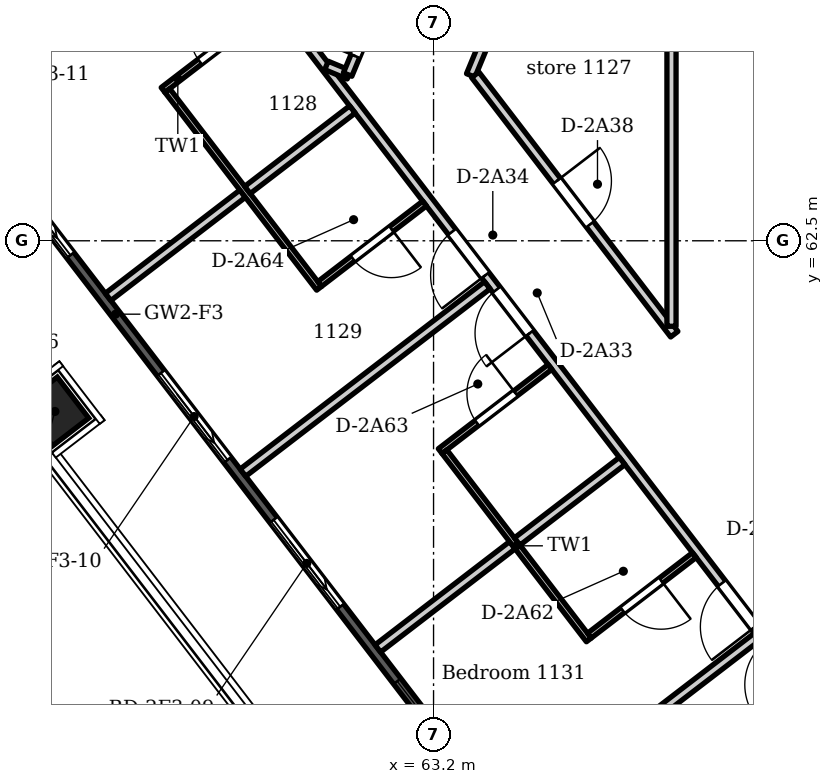
"""IFC4 building model, lengths in metres.
Left out: names, types, materials, properties, quantities, classifications, styles, units other than length and angle.
Written with IfcOpenShell. Run it as: python <this file> out.ifc"""

import sys

from ifc_helpers import new_model, si_unit, direction, frame, frame_2d, origin, origin_2d, place, context, subcontext, project, spatial, polyline, rectangle, outline, extrude, element, fill, save


model = new_model("IFC4")
c1 = context("Model", 3, precision=1e-05, world=origin(), true_north=direction((0.0, 1.0)))
c2 = subcontext(c1, "Body", "Model", "MODEL_VIEW")
j1 = project(units=[si_unit("LENGTHUNIT", "METRE"), si_unit("PLANEANGLEUNIT", "RADIAN")], contexts=[c1])
p1 = place(None, origin())
s1 = spatial("IfcSite", under=j1, at=p1, CompositionType="ELEMENT")
p2 = place(p1, origin())
s2 = spatial("IfcBuilding", under=s1, at=p2, CompositionType="ELEMENT")
p3 = place(p2, frame((0.0, 0.0, 50.4)))
s3 = spatial("IfcBuildingStorey", under=s2, at=p3, CompositionType="ELEMENT", Elevation=50.4)
p4 = place(p3, frame((56.974, 59.693, -0.35), z_axis=(0.0, 0.0, 1.0), x_axis=(-0.608761429009, 0.793353340291, 0.0)))
e1 = element("IfcColumn", 1, at=p4, inside=s3, PredefinedType="COLUMN", context=c2, shape_type="SweptSolid", body=[
    extrude(rectangle(XDim=0.85, YDim=0.75, at=origin_2d()), origin(), (0.0, 0.0, 1.0), 3.95),
])
p5 = place(p3, frame((79.969, 32.624, 0.0), z_axis=(0.0, 0.0, 1.0), x_axis=(-0.608761526367, 0.793353265585, 0.0)))
e2 = element("IfcWall", 2, at=p5, inside=s3, PredefinedType="SOLIDWALL", context=c2, shape_type="SweptSolid", body=[
    extrude(outline(polyline([(0.149, 0.075), (0.149, -0.075), (47.217, -0.075), (47.217, 0.075), (0.149, 0.075)])), origin(), (0.0, 0.0, 1.0), 3.3),
])
p6 = place(p5, frame((1.222, 0.0, 0.0)))
e3 = element("IfcOpeningElement", 3, at=p6, cuts=e2, PredefinedType="OPENING", context=c2, shape_type="SweptSolid", body=[
    extrude(rectangle(XDim=1.8, YDim=2.6, at=frame_2d((0.9, 1.3))), frame((0.0, 0.085, 0.0), z_axis=(0.0, -1.0, 0.0), x_axis=(1.0, 0.0, 0.0)), (0.0, 0.0, 1.0), 0.17),
])
p7 = place(p5, frame((4.565, 0.0, 0.0)))
e4 = element("IfcOpeningElement", 4, at=p7, cuts=e2, PredefinedType="OPENING", context=c2, shape_type="SweptSolid", body=[
    extrude(rectangle(XDim=1.8, YDim=2.6, at=frame_2d((0.9, 1.3))), frame((0.0, 0.085, 0.0), z_axis=(0.0, -1.0, 0.0), x_axis=(1.0, 0.0, 0.0)), (0.0, 0.0, 1.0), 0.17),
])
p8 = place(p5, frame((8.209, 0.0, 0.0)))
e5 = element("IfcOpeningElement", 5, at=p8, cuts=e2, PredefinedType="OPENING", context=c2, shape_type="SweptSolid", body=[
    extrude(rectangle(XDim=1.8, YDim=2.6, at=frame_2d((0.9, 1.3))), frame((0.0, 0.085, 0.0), z_axis=(0.0, -1.0, 0.0), x_axis=(1.0, 0.0, 0.0)), (0.0, 0.0, 1.0), 0.17),
])
p9 = place(p5, frame((12.453, 0.0, 0.0)))
e6 = element("IfcOpeningElement", 6, at=p9, cuts=e2, PredefinedType="OPENING", context=c2, shape_type="SweptSolid", body=[
    extrude(rectangle(XDim=1.8, YDim=2.6, at=frame_2d((0.9, 1.3))), frame((0.0, 0.085, 0.0), z_axis=(0.0, -1.0, 0.0), x_axis=(1.0, 0.0, 0.0)), (0.0, 0.0, 1.0), 0.17),
])
p10 = place(p5, frame((15.496, 0.0, 0.0)))
e7 = element("IfcOpeningElement", 7, at=p10, cuts=e2, PredefinedType="OPENING", context=c2, shape_type="SweptSolid", body=[
    extrude(rectangle(XDim=1.8, YDim=2.6, at=frame_2d((0.9, 1.3))), frame((0.0, 0.085, 0.0), z_axis=(0.0, -1.0, 0.0), x_axis=(1.0, 0.0, 0.0)), (0.0, 0.0, 1.0), 0.17),
])
p11 = place(p5, frame((18.84, 0.0, 0.15)))
e8 = element("IfcOpeningElement", 8, at=p11, cuts=e2, PredefinedType="OPENING", context=c2, shape_type="SweptSolid", body=[
    extrude(rectangle(XDim=2.4, YDim=2.45, at=frame_2d((1.2, 1.225))), frame((0.0, 0.085, 0.0), z_axis=(0.0, -1.0, 0.0), x_axis=(1.0, 0.0, 0.0)), (0.0, 0.0, 1.0), 0.17),
])
p12 = place(p5, frame((22.783, 0.0, 0.0)))
e9 = element("IfcOpeningElement", 9, at=p12, cuts=e2, PredefinedType="OPENING", context=c2, shape_type="SweptSolid", body=[
    extrude(rectangle(XDim=1.8, YDim=2.6, at=frame_2d((0.9, 1.3))), frame((0.0, 0.085, 0.0), z_axis=(0.0, -1.0, 0.0), x_axis=(1.0, 0.0, 0.0)), (0.0, 0.0, 1.0), 0.17),
])
p13 = place(p5, frame((26.127, 0.0, 0.15)))
e10 = element("IfcOpeningElement", 10, at=p13, cuts=e2, PredefinedType="OPENING", context=c2, shape_type="SweptSolid", body=[
    extrude(rectangle(XDim=2.4, YDim=2.45, at=frame_2d((1.2, 1.225))), frame((0.0, 0.085, 0.0), z_axis=(0.0, -1.0, 0.0), x_axis=(1.0, 0.0, 0.0)), (0.0, 0.0, 1.0), 0.17),
])
p14 = place(p5, frame((30.071, 0.0, 0.0)))
e11 = element("IfcOpeningElement", 11, at=p14, cuts=e2, PredefinedType="OPENING", context=c2, shape_type="SweptSolid", body=[
    extrude(rectangle(XDim=1.8, YDim=2.6, at=frame_2d((0.9, 1.3))), frame((0.0, 0.085, 0.0), z_axis=(0.0, -1.0, 0.0), x_axis=(1.0, 0.0, 0.0)), (0.0, 0.0, 1.0), 0.17),
])
p15 = place(p5, frame((33.114, 0.0, 0.0)))
e12 = element("IfcOpeningElement", 12, at=p15, cuts=e2, PredefinedType="OPENING", context=c2, shape_type="SweptSolid", body=[
    extrude(rectangle(XDim=1.8, YDim=2.6, at=frame_2d((0.9, 1.3))), frame((0.0, 0.085, 0.0), z_axis=(0.0, -1.0, 0.0), x_axis=(1.0, 0.0, 0.0)), (0.0, 0.0, 1.0), 0.17),
])
p16 = place(p5, frame((37.358, 0.0, 0.0)))
e13 = element("IfcOpeningElement", 13, at=p16, cuts=e2, PredefinedType="OPENING", context=c2, shape_type="SweptSolid", body=[
    extrude(rectangle(XDim=1.8, YDim=2.6, at=frame_2d((0.9, 1.3))), frame((0.0, 0.085, 0.0), z_axis=(0.0, -1.0, 0.0), x_axis=(1.0, 0.0, 0.0)), (0.0, 0.0, 1.0), 0.17),
])
p17 = place(p5, frame((41.001, 0.0, 0.0)))
e14 = element("IfcOpeningElement", 14, at=p17, cuts=e2, PredefinedType="OPENING", context=c2, shape_type="SweptSolid", body=[
    extrude(rectangle(XDim=1.8, YDim=2.6, at=frame_2d((0.9, 1.3))), frame((0.0, 0.085, 0.0), z_axis=(0.0, -1.0, 0.0), x_axis=(1.0, 0.0, 0.0)), (0.0, 0.0, 1.0), 0.17),
])
p18 = place(p5, frame((44.345, 0.0, 0.0)))
e15 = element("IfcOpeningElement", 15, at=p18, cuts=e2, PredefinedType="OPENING", context=c2, shape_type="SweptSolid", body=[
    extrude(rectangle(XDim=1.8, YDim=2.6, at=frame_2d((0.9, 1.3))), frame((0.0, 0.085, 0.0), z_axis=(0.0, -1.0, 0.0), x_axis=(1.0, 0.0, 0.0)), (0.0, 0.0, 1.0), 0.17),
])
p19 = place(p3, frame((57.534, 70.427, 0.0), z_axis=(0.0, 0.0, 1.0), x_axis=(0.608794371867, -0.793328061261, 0.0)))
e16 = element("IfcWall", 16, at=p19, inside=s3, PredefinedType="PARTITIONING", context=c2, shape_type="SweptSolid", body=[
    extrude(rectangle(XDim=19.759, YDim=0.15, at=frame_2d((9.88, 0.0))), origin(), (0.0, 0.0, 1.0), 3.3),
])
p20 = place(p19, frame((18.293, 0.0, 0.0)))
e17 = element("IfcOpeningElement", 17, at=p20, cuts=e16, PredefinedType="OPENING", context=c2, shape_type="SweptSolid", body=[
    extrude(rectangle(XDim=0.9, YDim=2.1, at=frame_2d((0.45, 1.05))), frame((0.0, 0.085, 0.0), z_axis=(0.0, -1.0, 0.0), x_axis=(1.0, 0.0, 0.0)), (0.0, 0.0, 1.0), 0.17),
])
p21 = place(p19, frame((17.093, 0.0, 0.0)))
e18 = element("IfcOpeningElement", 18, at=p21, cuts=e16, PredefinedType="OPENING", context=c2, shape_type="SweptSolid", body=[
    extrude(rectangle(XDim=0.9, YDim=2.1, at=frame_2d((0.45, 1.05))), frame((0.0, 0.085, 0.0), z_axis=(0.0, -1.0, 0.0), x_axis=(1.0, 0.0, 0.0)), (0.0, 0.0, 1.0), 0.17),
])
p22 = place(p19, frame((11.006, 0.0, 0.0)))
e19 = element("IfcOpeningElement", 19, at=p22, cuts=e16, PredefinedType="OPENING", context=c2, shape_type="SweptSolid", body=[
    extrude(rectangle(XDim=0.9, YDim=2.1, at=frame_2d((0.45, 1.05))), frame((0.0, 0.085, 0.0), z_axis=(0.0, -1.0, 0.0), x_axis=(1.0, 0.0, 0.0)), (0.0, 0.0, 1.0), 0.17),
])
p23 = place(p19, frame((9.806, 0.0, 0.0)))
e20 = element("IfcOpeningElement", 20, at=p23, cuts=e16, PredefinedType="OPENING", context=c2, shape_type="SweptSolid", body=[
    extrude(rectangle(XDim=0.9, YDim=2.1, at=frame_2d((0.45, 1.05))), frame((0.0, 0.085, 0.0), z_axis=(0.0, -1.0, 0.0), x_axis=(1.0, 0.0, 0.0)), (0.0, 0.0, 1.0), 0.17),
])
p24 = place(p3, frame((57.848, 61.576, 0.0), z_axis=(0.0, 0.0, 1.0), x_axis=(0.793280814045, 0.608855935397, 0.0)))
e21 = element("IfcWall", 21, at=p24, inside=s3, PredefinedType="PARTITIONING", context=c2, shape_type="SweptSolid", body=[
    extrude(rectangle(XDim=2.789, YDim=0.15, at=frame_2d((1.395, 0.0))), origin(), (0.0, 0.0, 1.0), 3.3),
])
p25 = place(p3, frame((58.751, 64.981, 0.0), z_axis=(0.0, 0.0, 1.0), x_axis=(0.793437070432, 0.608652294224, 0.0)))
e22 = element("IfcWall", 22, at=p25, inside=s3, PredefinedType="PARTITIONING", context=c2, shape_type="SweptSolid", body=[
    extrude(rectangle(XDim=2.275, YDim=0.1, at=frame_2d((1.138, 0.0))), origin(), (0.0, 0.0, 1.0), 3.3),
])
p26 = place(p25, frame((0.762, 0.0, 0.0)))
e23 = element("IfcOpeningElement", 23, at=p26, cuts=e22, PredefinedType="OPENING", context=c2, shape_type="SweptSolid", body=[
    extrude(rectangle(XDim=0.8, YDim=2.1, at=frame_2d((0.4, 1.05))), frame((0.0, 0.06, 0.0), z_axis=(0.0, -1.0, 0.0), x_axis=(1.0, 0.0, 0.0)), (0.0, 0.0, 1.0), 0.12),
])
p27 = place(p3, frame((58.821, 64.971, 0.0), z_axis=(0.0, 0.0, 1.0), x_axis=(0.608766496324, -0.793349451978, 0.0)))
e24 = element("IfcWall", 24, at=p27, inside=s3, PredefinedType="PARTITIONING", context=c2, shape_type="SweptSolid", body=[
    extrude(rectangle(XDim=4.1, YDim=0.1, at=frame_2d((2.05, 0.0))), origin(), (0.0, 0.0, 1.0), 3.3),
])
p28 = place(p3, frame((60.066, 58.686, 0.0), z_axis=(0.0, 0.0, 1.0), x_axis=(0.793444149255, 0.608643066184, 0.0)))
e25 = element("IfcWall", 25, at=p28, inside=s3, PredefinedType="PARTITIONING", context=c2, shape_type="SweptSolid", body=[
    extrude(rectangle(XDim=5.064, YDim=0.15, at=frame_2d((2.532, 0.0))), origin(), (0.0, 0.0, 1.0), 3.3),
])
p29 = place(p3, frame((60.14, 63.335, 0.0), z_axis=(0.0, 0.0, 1.0), x_axis=(0.79342025342, 0.608674216197, 0.0)))
e26 = element("IfcWall", 26, at=p29, inside=s3, PredefinedType="PARTITIONING", context=c2, shape_type="SweptSolid", body=[
    extrude(rectangle(XDim=2.175, YDim=0.15, at=frame_2d((1.088, 0.0))), origin(), (0.0, 0.0, 1.0), 3.3),
])
p30 = place(p3, frame((61.327, 61.788, 0.0), z_axis=(0.0, 0.0, 1.0), x_axis=(0.79342025342, 0.608674216197, 0.0)))
e27 = element("IfcWall", 27, at=p30, inside=s3, PredefinedType="PARTITIONING", context=c2, shape_type="SweptSolid", body=[
    extrude(rectangle(XDim=2.175, YDim=0.1, at=frame_2d((1.088, 0.0))), origin(), (0.0, 0.0, 1.0), 3.3),
])
p31 = place(p30, frame((0.688, 0.0, 0.0)))
e28 = element("IfcOpeningElement", 28, at=p31, cuts=e27, PredefinedType="OPENING", context=c2, shape_type="SweptSolid", body=[
    extrude(rectangle(XDim=0.8, YDim=2.1, at=frame_2d((0.4, 1.05))), frame((0.0, 0.06, 0.0), z_axis=(0.0, -1.0, 0.0), x_axis=(1.0, 0.0, 0.0)), (0.0, 0.0, 1.0), 0.12),
])
p32 = place(p3, frame((61.439, 65.383, 0.0), z_axis=(0.0, 0.0, 1.0), x_axis=(0.923599819829, -0.383358021714, 0.0)))
e29 = element("IfcWall", 29, at=p32, inside=s3, PredefinedType="PARTITIONING", context=c2, shape_type="SweptSolid", body=[
    extrude(rectangle(XDim=0.4, YDim=0.15, at=frame_2d((0.2, 0.0))), origin(), (0.0, 0.0, 1.0), 3.3),
])
p33 = place(p3, frame((61.787, 65.234, 0.0), z_axis=(0.0, 0.0, 1.0), x_axis=(0.38314285934, 0.923689097769, 0.0)))
e30 = element("IfcWall", 30, at=p33, inside=s3, PredefinedType="PARTITIONING", context=c2, shape_type="SweptSolid", body=[
    extrude(rectangle(XDim=1.908, YDim=0.15, at=frame_2d((0.954, 0.0))), origin(), (0.0, 0.0, 1.0), 3.3),
])
p34 = place(p33, frame((0.328, 0.0, 0.0)))
e31 = element("IfcOpeningElement", 31, at=p34, cuts=e30, PredefinedType="OPENING", context=c2, shape_type="SweptSolid", body=[
    extrude(rectangle(XDim=0.8, YDim=2.1, at=frame_2d((0.4, 1.05))), frame((0.0, 0.085, 0.0), z_axis=(0.0, -1.0, 0.0), x_axis=(1.0, 0.0, 0.0)), (0.0, 0.0, 1.0), 0.17),
])
p35 = place(p3, frame((62.284, 55.795, 0.0), z_axis=(0.0, 0.0, 1.0), x_axis=(0.793280814045, 0.608855935397, 0.0)))
e32 = element("IfcWall", 32, at=p35, inside=s3, PredefinedType="PARTITIONING", context=c2, shape_type="SweptSolid", body=[
    extrude(rectangle(XDim=2.789, YDim=0.15, at=frame_2d((1.395, 0.0))), origin(), (0.0, 0.0, 1.0), 3.3),
])
p36 = place(p3, frame((63.309, 59.041, 0.0), z_axis=(0.0, 0.0, 1.0), x_axis=(0.793437070432, 0.608652294224, 0.0)))
e33 = element("IfcWall", 33, at=p36, inside=s3, PredefinedType="PARTITIONING", context=c2, shape_type="SweptSolid", body=[
    extrude(rectangle(XDim=2.275, YDim=0.1, at=frame_2d((1.138, 0.0))), origin(), (0.0, 0.0, 1.0), 3.3),
])
p37 = place(p36, frame((0.762, 0.0, 0.0)))
e34 = element("IfcOpeningElement", 34, at=p37, cuts=e33, PredefinedType="OPENING", context=c2, shape_type="SweptSolid", body=[
    extrude(rectangle(XDim=0.8, YDim=2.1, at=frame_2d((0.4, 1.05))), frame((0.0, 0.06, 0.0), z_axis=(0.0, -1.0, 0.0), x_axis=(1.0, 0.0, 0.0)), (0.0, 0.0, 1.0), 0.12),
])
p38 = place(p3, frame((63.379, 59.031, 0.0), z_axis=(0.0, 0.0, 1.0), x_axis=(0.608627311208, -0.79345623449, 0.0)))
e35 = element("IfcWall", 35, at=p38, inside=s3, PredefinedType="PARTITIONING", context=c2, shape_type="SweptSolid", body=[
    extrude(rectangle(XDim=3.901, YDim=0.1, at=frame_2d((1.95, 0.0))), origin(), (0.0, 0.0, 1.0), 3.3),
])
p39 = place(p3, frame((63.811, 65.22, 0.0), z_axis=(0.0, 0.0, 1.0), x_axis=(0.382485754441, 0.923961388614, 0.0)))
e36 = element("IfcWall", 36, at=p39, inside=s3, PredefinedType="PARTITIONING", context=c2, shape_type="SweptSolid", body=[
    extrude(rectangle(XDim=2.736, YDim=0.15, at=frame_2d((1.368, 0.0))), origin(), (0.0, 0.0, 1.0), 3.3),
])
p40 = place(p3, frame((63.886, 65.229, 0.0), z_axis=(0.0, 0.0, 1.0), x_axis=(0.608696503356, -0.793403155276, 0.0)))
e37 = element("IfcWall", 37, at=p40, inside=s3, PredefinedType="PARTITIONING", context=c2, shape_type="SweptSolid", body=[
    extrude(rectangle(XDim=5.377, YDim=0.15, at=frame_2d((2.688, 0.0))), origin(), (0.0, 0.0, 1.0), 3.3),
])
p41 = place(p40, frame((2.201, 0.0, 0.0)))
e38 = element("IfcOpeningElement", 38, at=p41, cuts=e37, PredefinedType="OPENING", context=c2, shape_type="SweptSolid", body=[
    extrude(rectangle(XDim=0.9, YDim=2.1, at=frame_2d((0.45, 1.05))), frame((0.0, 0.085, 0.0), z_axis=(0.0, -1.0, 0.0), x_axis=(1.0, 0.0, 0.0)), (0.0, 0.0, 1.0), 0.17),
])
p42 = place(p3, frame((64.502, 52.904, 0.0), z_axis=(0.0, 0.0, 1.0), x_axis=(0.793351017656, 0.608764455913, 0.0)))
e39 = element("IfcWall", 39, at=p42, inside=s3, PredefinedType="PARTITIONING", context=c2, shape_type="SweptSolid", body=[
    extrude(rectangle(XDim=5.064, YDim=0.15, at=frame_2d((2.532, 0.0))), origin(), (0.0, 0.0, 1.0), 3.3),
])
p43 = place(p3, frame((64.576, 57.554, 0.0), z_axis=(0.0, 0.0, 1.0), x_axis=(0.79342025342, 0.608674216197, 0.0)))
e40 = element("IfcWall", 40, at=p43, inside=s3, PredefinedType="PARTITIONING", context=c2, shape_type="SweptSolid", body=[
    extrude(rectangle(XDim=2.175, YDim=0.15, at=frame_2d((1.088, 0.0))), origin(), (0.0, 0.0, 1.0), 3.3),
])
p44 = place(p3, frame((65.763, 56.006, 0.0), z_axis=(0.0, 0.0, 1.0), x_axis=(0.793203445283, 0.608956726206, 0.0)))
e41 = element("IfcWall", 41, at=p44, inside=s3, PredefinedType="PARTITIONING", context=c2, shape_type="SweptSolid", body=[
    extrude(rectangle(XDim=2.176, YDim=0.1, at=frame_2d((1.088, 0.0))), origin(), (0.0, 0.0, 1.0), 3.3),
])
p45 = place(p44, frame((0.688, 0.0, 0.0)))
e42 = element("IfcOpeningElement", 42, at=p45, cuts=e41, PredefinedType="OPENING", context=c2, shape_type="SweptSolid", body=[
    extrude(rectangle(XDim=0.8, YDim=2.1, at=frame_2d((0.4, 1.05))), frame((0.0, 0.06, 0.0), z_axis=(0.0, -1.0, 0.0), x_axis=(1.0, 0.0, 0.0)), (0.0, 0.0, 1.0), 0.12),
])
p46 = place(p3, frame((67.113, 61.094, 0.0), z_axis=(0.0, 0.0, 1.0), x_axis=(0.0, 1.0, 0.0)))
e43 = element("IfcWall", 43, at=p46, inside=s3, PredefinedType="PARTITIONING", context=c2, shape_type="SweptSolid", body=[
    extrude(rectangle(XDim=4.934, YDim=0.15, at=frame_2d((2.467, 0.0))), origin(), (0.0, 0.0, 1.0), 3.3),
])
p47 = place(p13, origin())
e44 = element("IfcWindow", 44, at=p47, inside=s3, PartitioningType="SINGLE_PANEL", PredefinedType="WINDOW", context=c2, shape_type="SweptSolid", body=[
    extrude(rectangle(XDim=2.4, YDim=2.45, at=frame_2d((1.2, 1.225))), frame((0.0, 0.03, 0.0), z_axis=(0.0, -1.0, 0.0), x_axis=(1.0, 0.0, 0.0)), (0.0, 0.0, 1.0), 0.06),
])
fill(e10, e44)
p48 = place(p14, origin())
e45 = element("IfcDoor", 45, at=p48, inside=s3, OperationType="SLIDING_TO_LEFT", PredefinedType="DOOR", context=c2, shape_type="SweptSolid", body=[
    extrude(rectangle(XDim=1.8, YDim=2.6, at=frame_2d((0.9, 1.3))), frame((0.0, 0.025, 0.0), z_axis=(0.0, -1.0, 0.0), x_axis=(1.0, 0.0, 0.0)), (0.0, 0.0, 1.0), 0.05),
])
fill(e11, e45)
p49 = place(p15, origin())
e46 = element("IfcDoor", 46, at=p49, inside=s3, OperationType="SLIDING_TO_LEFT", PredefinedType="DOOR", context=c2, shape_type="SweptSolid", body=[
    extrude(rectangle(XDim=1.8, YDim=2.6, at=frame_2d((0.9, 1.3))), frame((0.0, 0.025, 0.0), z_axis=(0.0, -1.0, 0.0), x_axis=(1.0, 0.0, 0.0)), (0.0, 0.0, 1.0), 0.05),
])
fill(e12, e46)
p50 = place(p16, origin())
e47 = element("IfcDoor", 47, at=p50, inside=s3, OperationType="SLIDING_TO_LEFT", PredefinedType="DOOR", context=c2, shape_type="SweptSolid", body=[
    extrude(rectangle(XDim=1.8, YDim=2.6, at=frame_2d((0.9, 1.3))), frame((0.0, 0.025, 0.0), z_axis=(0.0, -1.0, 0.0), x_axis=(1.0, 0.0, 0.0)), (0.0, 0.0, 1.0), 0.05),
])
fill(e13, e47)
p51 = place(p34, origin())
e48 = element("IfcDoor", 48, at=p51, inside=s3, OperationType="SINGLE_SWING_LEFT", PredefinedType="DOOR", context=c2, shape_type="SweptSolid", body=[
    extrude(rectangle(XDim=0.8, YDim=2.1, at=frame_2d((0.4, 1.05))), frame((0.0, 0.025, 0.0), z_axis=(0.0, -1.0, 0.0), x_axis=(1.0, 0.0, 0.0)), (0.0, 0.0, 1.0), 0.05),
])
fill(e31, e48)
p52 = place(p21, frame((0.9, 0.0, 0.0), z_axis=(0.0, 0.0, 1.0), x_axis=(-1.0, 0.0, 0.0)))
e49 = element("IfcDoor", 49, at=p52, inside=s3, OperationType="SINGLE_SWING_LEFT", PredefinedType="DOOR", context=c2, shape_type="SweptSolid", body=[
    extrude(rectangle(XDim=0.9, YDim=2.1, at=frame_2d((0.45, 1.05))), frame((0.0, 0.025, 0.0), z_axis=(0.0, -1.0, 0.0), x_axis=(1.0, 0.0, 0.0)), (0.0, 0.0, 1.0), 0.05),
])
fill(e18, e49)
p53 = place(p22, frame((0.9, 0.0, 0.0), z_axis=(0.0, 0.0, 1.0), x_axis=(-1.0, 0.0, 0.0)))
e50 = element("IfcDoor", 50, at=p53, inside=s3, OperationType="SINGLE_SWING_LEFT", PredefinedType="DOOR", context=c2, shape_type="SweptSolid", body=[
    extrude(rectangle(XDim=0.9, YDim=2.1, at=frame_2d((0.45, 1.05))), frame((0.0, 0.025, 0.0), z_axis=(0.0, -1.0, 0.0), x_axis=(1.0, 0.0, 0.0)), (0.0, 0.0, 1.0), 0.05),
])
fill(e19, e50)
p54 = place(p23, frame((0.9, 0.0, 0.0), z_axis=(0.0, 0.0, 1.0), x_axis=(-1.0, 0.0, 0.0)))
e51 = element("IfcDoor", 51, at=p54, inside=s3, OperationType="SINGLE_SWING_LEFT", PredefinedType="DOOR", context=c2, shape_type="SweptSolid", body=[
    extrude(rectangle(XDim=0.9, YDim=2.1, at=frame_2d((0.45, 1.05))), frame((0.0, 0.025, 0.0), z_axis=(0.0, -1.0, 0.0), x_axis=(1.0, 0.0, 0.0)), (0.0, 0.0, 1.0), 0.05),
])
fill(e20, e51)
p55 = place(p41, origin())
e52 = element("IfcDoor", 52, at=p55, inside=s3, OperationType="SINGLE_SWING_LEFT", PredefinedType="DOOR", context=c2, shape_type="SweptSolid", body=[
    extrude(rectangle(XDim=0.9, YDim=2.1, at=frame_2d((0.45, 1.05))), frame((0.0, 0.025, 0.0), z_axis=(0.0, -1.0, 0.0), x_axis=(1.0, 0.0, 0.0)), (0.0, 0.0, 1.0), 0.05),
])
fill(e38, e52)
p56 = place(p45, frame((0.8, 0.0, 0.0), z_axis=(0.0, 0.0, 1.0), x_axis=(-1.0, 0.0, 0.0)))
e53 = element("IfcDoor", 53, at=p56, inside=s3, OperationType="SINGLE_SWING_LEFT", PredefinedType="DOOR", context=c2, shape_type="SweptSolid", body=[
    extrude(rectangle(XDim=0.8, YDim=2.1, at=frame_2d((0.4, 1.05))), frame((0.0, 0.025, 0.0), z_axis=(0.0, -1.0, 0.0), x_axis=(1.0, 0.0, 0.0)), (0.0, 0.0, 1.0), 0.05),
])
fill(e42, e53)
p57 = place(p37, origin())
e54 = element("IfcDoor", 54, at=p57, inside=s3, OperationType="SINGLE_SWING_RIGHT", PredefinedType="DOOR", context=c2, shape_type="SweptSolid", body=[
    extrude(rectangle(XDim=0.8, YDim=2.1, at=frame_2d((0.4, 1.05))), frame((0.0, 0.025, 0.0), z_axis=(0.0, -1.0, 0.0), x_axis=(1.0, 0.0, 0.0)), (0.0, 0.0, 1.0), 0.05),
])
fill(e34, e54)
p58 = place(p31, frame((0.8, 0.0, 0.0), z_axis=(0.0, 0.0, 1.0), x_axis=(-1.0, 0.0, 0.0)))
e55 = element("IfcDoor", 55, at=p58, inside=s3, OperationType="SINGLE_SWING_LEFT", PredefinedType="DOOR", context=c2, shape_type="SweptSolid", body=[
    extrude(rectangle(XDim=0.8, YDim=2.1, at=frame_2d((0.4, 1.05))), frame((0.0, 0.025, 0.0), z_axis=(0.0, -1.0, 0.0), x_axis=(1.0, 0.0, 0.0)), (0.0, 0.0, 1.0), 0.05),
])
fill(e28, e55)
p59 = place(p26, origin())
e56 = element("IfcDoor", 56, at=p59, inside=s3, OperationType="SINGLE_SWING_RIGHT", PredefinedType="DOOR", context=c2, shape_type="SweptSolid", body=[
    extrude(rectangle(XDim=0.8, YDim=2.1, at=frame_2d((0.4, 1.05))), frame((0.0, 0.025, 0.0), z_axis=(0.0, -1.0, 0.0), x_axis=(1.0, 0.0, 0.0)), (0.0, 0.0, 1.0), 0.05),
])
fill(e23, e56)
save(model, sys.argv[1])
